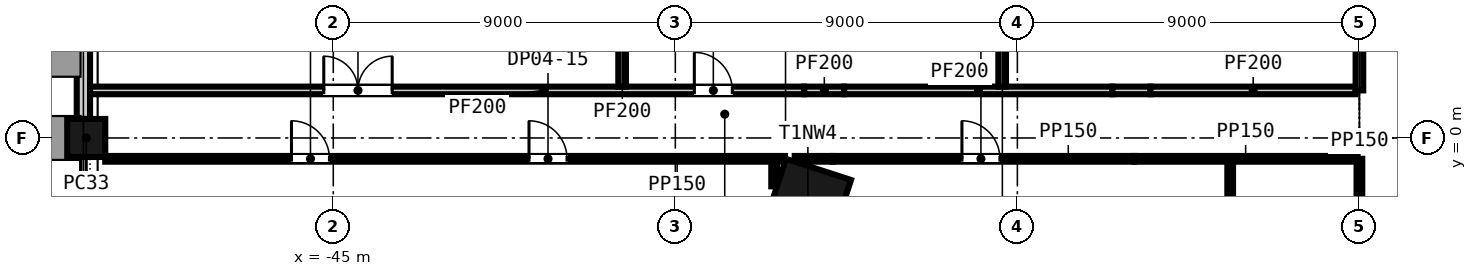
"""IFC4 building model, lengths in metres.
Left out: names, types, materials, properties, quantities, classifications, styles, units other than length and angle.
Written with IfcOpenShell. Run it as: python <this file> out.ifc"""

import sys

from ifc_helpers import new_model, si_unit, direction, frame, frame_2d, origin, origin_2d, place, context, subcontext, project, spatial, rectangle, extrude, element, fill, save


model = new_model("IFC4")
c1 = context("Model", 3, precision=1e-05, world=origin(), true_north=direction((0.0, 1.0)))
c2 = subcontext(c1, "Body", "Model", "MODEL_VIEW")
j1 = project(units=[si_unit("LENGTHUNIT", "METRE"), si_unit("PLANEANGLEUNIT", "RADIAN")], contexts=[c1])
p1 = place(None, origin())
s1 = spatial("IfcSite", under=j1, at=p1, CompositionType="ELEMENT")
p2 = place(p1, origin())
s2 = spatial("IfcBuilding", under=s1, at=p2, CompositionType="ELEMENT")
p3 = place(p2, frame((0.0, 0.0, 27.0)))
s3 = spatial("IfcBuildingStorey", under=s2, at=p3, CompositionType="ELEMENT", Elevation=27.0)
p4 = place(p3, frame((-32.512, -1.683, -0.3), z_axis=(0.0, 0.0, 1.0), x_axis=(-0.309016994375, -0.951056516295, 0.0)))
e1 = element("IfcColumn", 1, at=p4, inside=s3, PredefinedType="COLUMN", context=c2, shape_type="SweptSolid", body=[
    extrude(rectangle(XDim=1.8, YDim=1.8, at=origin_2d()), origin(), (0.0, 0.0, 1.0), 4.5),
])
p5 = place(p3, frame((-51.5, 0.0, -0.3), z_axis=(0.0, 0.0, 1.0), x_axis=(0.0, -1.0, 0.0)))
e2 = element("IfcColumn", 2, at=p5, inside=s3, PredefinedType="COLUMN", context=c2, shape_type="SweptSolid", body=[
    extrude(rectangle(XDim=1.0, YDim=1.0, at=origin_2d()), origin(), (0.0, 0.0, 1.0), 4.5),
])
p6 = place(p3, frame((-51.575, 8.25, -0.3), z_axis=(0.0, 0.0, 1.0), x_axis=(0.0, -1.0, 0.0)))
e3 = element("IfcWall", 3, at=p6, inside=s3, PredefinedType="SOLIDWALL", context=c2, shape_type="SweptSolid", body=[
    extrude(rectangle(XDim=7.75, YDim=0.35, at=frame_2d((3.875, 0.0))), origin(), (0.0, 0.0, 1.0), 3.6),
])
p7 = place(p6, frame((2.875, 0.0, 1.2)))
e4 = element("IfcOpeningElement", 4, at=p7, cuts=e3, PredefinedType="OPENING", context=c2, shape_type="SweptSolid", body=[
    extrude(rectangle(XDim=2.0, YDim=2.35, at=frame_2d((1.0, 1.175))), frame((0.0, 0.185, 0.0), z_axis=(0.0, -1.0, 0.0), x_axis=(1.0, 0.0, 0.0)), (0.0, 0.0, 1.0), 0.37),
])
p8 = place(p3, frame((-51.0, -0.549, 0.0), z_axis=(0.0, 0.0, 1.0), x_axis=(1.0, 0.0, 0.0)))
e5 = element("IfcWall", 5, at=p8, inside=s3, PredefinedType="PARTITIONING", context=c2, shape_type="SweptSolid", body=[
    extrude(rectangle(XDim=17.886, YDim=0.15, at=frame_2d((8.943, 0.0))), origin(), (0.0, 0.0, 1.0), 4.2),
])
p9 = place(p8, frame((4.9, 0.0, 0.0)))
e6 = element("IfcOpeningElement", 6, at=p9, cuts=e5, PredefinedType="OPENING", context=c2, shape_type="SweptSolid", body=[
    extrude(rectangle(XDim=1.0, YDim=2.1, at=frame_2d((0.5, 1.05))), frame((0.0, 0.085, 0.0), z_axis=(0.0, -1.0, 0.0), x_axis=(1.0, 0.0, 0.0)), (0.0, 0.0, 1.0), 0.17),
])
p10 = place(p8, frame((11.15, 0.0, 0.0)))
e7 = element("IfcOpeningElement", 7, at=p10, cuts=e5, PredefinedType="OPENING", context=c2, shape_type="SweptSolid", body=[
    extrude(rectangle(XDim=1.0, YDim=2.1, at=frame_2d((0.5, 1.05))), frame((0.0, 0.085, 0.0), z_axis=(0.0, -1.0, 0.0), x_axis=(1.0, 0.0, 0.0)), (0.0, 0.0, 1.0), 0.17),
])
p11 = place(p3, frame((-32.859, -0.549, 0.0), z_axis=(0.0, 0.0, 1.0), x_axis=(1.0, 0.0, 0.0)))
e8 = element("IfcWall", 8, at=p11, inside=s3, PredefinedType="PARTITIONING", context=c2, shape_type="SweptSolid", body=[
    extrude(rectangle(XDim=1.0, YDim=0.15, at=frame_2d((0.5, 0.0))), origin(), (0.0, 0.0, 1.0), 3.2),
])
p12 = place(p3, frame((-31.859, -0.549, 0.0), z_axis=(0.0, 0.0, 1.0), x_axis=(1.0, 0.0, 0.0)))
e9 = element("IfcWall", 9, at=p12, inside=s3, PredefinedType="PARTITIONING", context=c2, shape_type="SweptSolid", body=[
    extrude(rectangle(XDim=7.936, YDim=0.15, at=frame_2d((3.968, 0.0))), origin(), (0.0, 0.0, 1.0), 4.2),
])
p13 = place(p12, frame((3.4, 0.0, 0.0)))
e10 = element("IfcOpeningElement", 10, at=p13, cuts=e9, PredefinedType="OPENING", context=c2, shape_type="SweptSolid", body=[
    extrude(rectangle(XDim=1.0, YDim=2.1, at=frame_2d((0.5, 1.05))), frame((0.0, 0.085, 0.0), z_axis=(0.0, -1.0, 0.0), x_axis=(1.0, 0.0, 0.0)), (0.0, 0.0, 1.0), 0.17),
])
p14 = place(p3, frame((-23.923, -0.549, 0.0), z_axis=(0.0, 0.0, 1.0), x_axis=(1.0, 0.0, 0.0)))
e11 = element("IfcWall", 11, at=p14, inside=s3, PredefinedType="PARTITIONING", context=c2, shape_type="SweptSolid", body=[
    extrude(rectangle(XDim=5.848, YDim=0.15, at=frame_2d((2.924, 0.0))), origin(), (0.0, 0.0, 1.0), 3.521),
])
p15 = place(p3, frame((-51.4, 1.251, 0.0), z_axis=(0.0, 0.0, 1.0), x_axis=(1.0, 0.0, 0.0)))
e12 = element("IfcWall", 12, at=p15, inside=s3, PredefinedType="PARTITIONING", context=c2, shape_type="SweptSolid", body=[
    extrude(rectangle(XDim=18.79, YDim=0.2, at=frame_2d((9.395, 0.0))), origin(), (0.0, 0.0, 1.0), 4.2),
])
p16 = place(p15, frame((6.15, 0.0, 0.0)))
e13 = element("IfcOpeningElement", 13, at=p16, cuts=e12, PredefinedType="OPENING", context=c2, shape_type="SweptSolid", body=[
    extrude(rectangle(XDim=1.8, YDim=2.4, at=frame_2d((0.9, 1.2))), frame((0.0, 0.11, 0.0), z_axis=(0.0, -1.0, 0.0), x_axis=(1.0, 0.0, 0.0)), (0.0, 0.0, 1.0), 0.22),
])
p17 = place(p15, frame((15.9, 0.0, 0.0)))
e14 = element("IfcOpeningElement", 14, at=p17, cuts=e12, PredefinedType="OPENING", context=c2, shape_type="SweptSolid", body=[
    extrude(rectangle(XDim=1.0, YDim=2.1, at=frame_2d((0.5, 1.05))), frame((0.0, 0.11, 0.0), z_axis=(0.0, -1.0, 0.0), x_axis=(1.0, 0.0, 0.0)), (0.0, 0.0, 1.0), 0.22),
])
p18 = place(p3, frame((-32.61, 1.251, 0.0), z_axis=(0.0, 0.0, 1.0), x_axis=(1.0, 0.0, 0.0)))
e15 = element("IfcWall", 15, at=p18, inside=s3, PredefinedType="PARTITIONING", context=c2, shape_type="SweptSolid", body=[
    extrude(rectangle(XDim=1.052, YDim=0.2, at=frame_2d((0.526, 0.0))), origin(), (0.0, 0.0, 1.0), 3.2),
])
p19 = place(p3, frame((-31.559, 1.251, 0.0), z_axis=(0.0, 0.0, 1.0), x_axis=(1.0, 0.0, 0.0)))
e16 = element("IfcWall", 16, at=p19, inside=s3, PredefinedType="PARTITIONING", context=c2, shape_type="SweptSolid", body=[
    extrude(rectangle(XDim=7.059, YDim=0.2, at=frame_2d((3.529, 0.0))), origin(), (0.0, 0.0, 1.0), 4.2),
])
p20 = place(p3, frame((-24.5, 1.251, 0.0), z_axis=(0.0, 0.0, 1.0), x_axis=(1.0, 0.0, 0.0)))
e17 = element("IfcWall", 17, at=p20, inside=s3, PredefinedType="PARTITIONING", context=c2, shape_type="SweptSolid", body=[
    extrude(rectangle(XDim=1.0, YDim=0.2, at=frame_2d((0.5, 0.0))), origin(), (0.0, 0.0, 1.0), 3.286),
])
p21 = place(p3, frame((-23.5, 1.251, 0.0), z_axis=(0.0, 0.0, 1.0), x_axis=(1.0, 0.0, 0.0)))
e18 = element("IfcWall", 18, at=p21, inside=s3, PredefinedType="PARTITIONING", context=c2, shape_type="SweptSolid", body=[
    extrude(rectangle(XDim=5.4, YDim=0.2, at=frame_2d((2.7, 0.0))), origin(), (0.0, 0.0, 1.0), 4.2),
])
p22 = place(p3, frame((-37.4, 1.351, 0.0), z_axis=(0.0, 0.0, 1.0), x_axis=(0.0, 1.0, 0.0)))
e19 = element("IfcWall", 19, at=p22, inside=s3, PredefinedType="PARTITIONING", context=c2, shape_type="SweptSolid", body=[
    extrude(rectangle(XDim=2.282, YDim=0.2, at=frame_2d((1.141, 0.0))), origin(), (0.0, 0.0, 1.0), 4.2),
])
p23 = place(p3, frame((-33.4, -1.272, 0.0), z_axis=(0.0, 0.0, 1.0), x_axis=(0.0, 1.0, 0.0)))
e20 = element("IfcWall", 20, at=p23, inside=s3, PredefinedType="PARTITIONING", context=c2, shape_type="SweptSolid", body=[
    extrude(rectangle(XDim=0.648, YDim=0.15, at=frame_2d((0.324, 0.0))), origin(), (0.0, 0.0, 1.0), 4.2),
])
p24 = place(p3, frame((-27.4, 1.351, 0.0), z_axis=(0.0, 0.0, 1.0), x_axis=(0.0, 1.0, 0.0)))
e21 = element("IfcWall", 21, at=p24, inside=s3, PredefinedType="PARTITIONING", context=c2, shape_type="SweptSolid", body=[
    extrude(rectangle(XDim=11.443, YDim=0.2, at=frame_2d((5.721, 0.0))), origin(), (0.0, 0.0, 1.0), 4.2),
])
p25 = place(p3, frame((-21.4, -15.389, 0.0), z_axis=(0.0, 0.0, 1.0), x_axis=(0.0, 1.0, 0.0)))
e22 = element("IfcWall", 22, at=p25, inside=s3, PredefinedType="PARTITIONING", context=c2, shape_type="SweptSolid", body=[
    extrude(rectangle(XDim=14.765, YDim=0.15, at=frame_2d((7.382, 0.0))), origin(), (0.0, 0.0, 1.0), 4.2),
])
p26 = place(p3, frame((-18.0, -3.2, 0.0), z_axis=(0.0, 0.0, 1.0), x_axis=(0.0, 1.0, 0.0)))
e23 = element("IfcWall", 23, at=p26, inside=s3, PredefinedType="PARTITIONING", context=c2, shape_type="SweptSolid", body=[
    extrude(rectangle(XDim=2.651, YDim=0.15, at=frame_2d((1.326, 0.0))), origin(), (0.0, 0.0, 1.0), 4.2),
])
p27 = place(p3, frame((-18.0, 1.251, 0.0), z_axis=(0.0, 0.0, 1.0), x_axis=(0.0, 1.0, 0.0)))
e24 = element("IfcWall", 24, at=p27, inside=s3, PredefinedType="PARTITIONING", context=c2, shape_type="SweptSolid", body=[
    extrude(rectangle(XDim=13.749, YDim=0.2, at=frame_2d((6.875, 0.0))), origin(), (0.0, 0.0, 1.0), 4.2),
])
p28 = place(p27, frame((6.4, 0.0, 0.0)))
e25 = element("IfcOpeningElement", 25, at=p28, cuts=e24, PredefinedType="OPENING", context=c2, shape_type="SweptSolid", body=[
    extrude(rectangle(XDim=1.0, YDim=2.1, at=frame_2d((0.5, 1.05))), frame((0.0, 0.11, 0.0), z_axis=(0.0, -1.0, 0.0), x_axis=(1.0, 0.0, 0.0)), (0.0, 0.0, 1.0), 0.22),
])
p29 = place(p9, origin())
e26 = element("IfcDoor", 26, at=p29, inside=s3, OperationType="SINGLE_SWING_LEFT", PredefinedType="DOOR", context=c2, shape_type="SweptSolid", body=[
    extrude(rectangle(XDim=1.0, YDim=2.1, at=frame_2d((0.5, 1.05))), frame((0.0, 0.025, 0.0), z_axis=(0.0, -1.0, 0.0), x_axis=(1.0, 0.0, 0.0)), (0.0, 0.0, 1.0), 0.05),
])
fill(e6, e26)
p30 = place(p10, origin())
e27 = element("IfcDoor", 27, at=p30, inside=s3, OperationType="SINGLE_SWING_LEFT", PredefinedType="DOOR", context=c2, shape_type="SweptSolid", body=[
    extrude(rectangle(XDim=1.0, YDim=2.1, at=frame_2d((0.5, 1.05))), frame((0.0, 0.025, 0.0), z_axis=(0.0, -1.0, 0.0), x_axis=(1.0, 0.0, 0.0)), (0.0, 0.0, 1.0), 0.05),
])
fill(e7, e27)
p31 = place(p13, origin())
e28 = element("IfcDoor", 28, at=p31, inside=s3, OperationType="SINGLE_SWING_LEFT", PredefinedType="DOOR", context=c2, shape_type="SweptSolid", body=[
    extrude(rectangle(XDim=1.0, YDim=2.1, at=frame_2d((0.5, 1.05))), frame((0.0, 0.025, 0.0), z_axis=(0.0, -1.0, 0.0), x_axis=(1.0, 0.0, 0.0)), (0.0, 0.0, 1.0), 0.05),
])
fill(e10, e28)
p32 = place(p16, origin())
e29 = element("IfcDoor", 29, at=p32, inside=s3, OperationType="SINGLE_SWING_LEFT", PredefinedType="DOOR", context=c2, shape_type="SweptSolid", body=[
    extrude(rectangle(XDim=1.8, YDim=2.4, at=frame_2d((0.9, 1.2))), frame((0.0, 0.025, 0.0), z_axis=(0.0, -1.0, 0.0), x_axis=(1.0, 0.0, 0.0)), (0.0, 0.0, 1.0), 0.05),
])
fill(e13, e29)
p33 = place(p17, origin())
e30 = element("IfcDoor", 30, at=p33, inside=s3, OperationType="SINGLE_SWING_LEFT", PredefinedType="DOOR", context=c2, shape_type="SweptSolid", body=[
    extrude(rectangle(XDim=1.0, YDim=2.1, at=frame_2d((0.5, 1.05))), frame((0.0, 0.025, 0.0), z_axis=(0.0, -1.0, 0.0), x_axis=(1.0, 0.0, 0.0)), (0.0, 0.0, 1.0), 0.05),
])
fill(e14, e30)
save(model, sys.argv[1])
